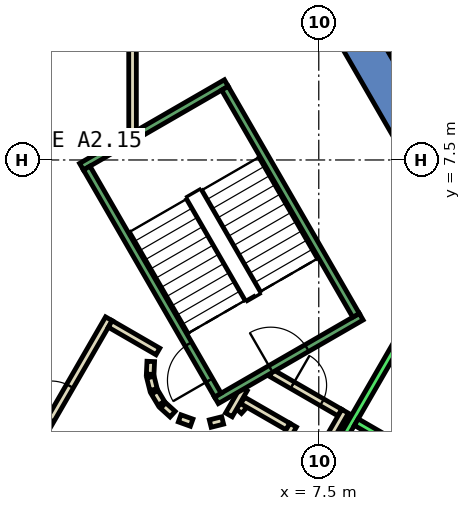
"""IFC4 building model, lengths in metres.
Left out: names, types, materials, properties, quantities, classifications, styles, units other than length and angle.
Written with IfcOpenShell. Run it as: python <this file> out.ifc"""

import sys

from ifc_helpers import new_model, si_unit, direction, frame, frame_2d, origin, place, context, subcontext, project, spatial, polyline, rectangle, outline, extrude, element, fill, save


model = new_model("IFC4")
c1 = context("Model", 3, precision=1e-05, world=origin(), true_north=direction((0.0, 1.0)))
c2 = subcontext(c1, "Body", "Model", "MODEL_VIEW")
j1 = project(units=[si_unit("LENGTHUNIT", "METRE"), si_unit("PLANEANGLEUNIT", "RADIAN")], contexts=[c1])
p1 = place(None, origin())
s1 = spatial("IfcSite", under=j1, at=p1, CompositionType="ELEMENT")
p2 = place(p1, origin())
s2 = spatial("IfcBuilding", under=s1, at=p2, CompositionType="ELEMENT")
p3 = place(p2, frame((0.0, 0.0, 68.6)))
s3 = spatial("IfcBuildingStorey", under=s2, at=p3, CompositionType="ELEMENT", Elevation=68.6)
p4 = place(p3, frame((0.0, 0.0, -0.4)))
e1 = element("IfcWall", 1, at=p4, inside=s3, PredefinedType="SHEAR", context=c2, shape_type="SweptSolid", body=[
    extrude(outline(polyline([(8.517, 11.748), (7.651, 11.248), (12.702, 2.5), (13.856, 2.5), (8.517, 11.748)])), origin(), (0.0, 0.0, 1.0), 4.2),
])
p5 = place(p3, frame((1.88, 7.8, 0.0), z_axis=(0.0, 0.0, 1.0), x_axis=(-1.0, 0.0, 0.0)))
e2 = element("IfcWall", 2, at=p5, inside=s3, PredefinedType="PARTITIONING", context=c2, shape_type="SweptSolid", body=[
    extrude(rectangle(XDim=1.78, YDim=0.2, at=frame_2d((0.89, 0.0))), origin(), (0.0, 0.0, 1.0), 3.8),
])
p6 = place(p3, frame((2.599, 10.7, 0.0), z_axis=(0.0, 0.0, 1.0), x_axis=(0.000393159002, -0.999999922713, 0.0)))
e3 = element("IfcWall", 3, at=p6, inside=s3, PredefinedType="PARTITIONING", context=c2, shape_type="SweptSolid", body=[
    extrude(rectangle(XDim=2.484, YDim=0.2, at=frame_2d((1.242, 0.0))), origin(), (0.0, 0.0, 1.0), 3.8),
])
p7 = place(p3, frame((5.39, 0.898, 0.0), z_axis=(0.0, 0.0, 1.0), x_axis=(0.673828488714, 0.738887791073, 0.0)))
e4 = element("IfcWall", 4, at=p7, inside=s3, PredefinedType="PARTITIONING", context=c2, shape_type="SweptSolid", body=[
    extrude(rectangle(XDim=0.263, YDim=0.2, at=frame_2d((0.131, 0.0))), origin(), (0.0, 0.0, 1.0), 3.8),
])
p8 = place(p3, frame((5.499, 1.172, 0.0), z_axis=(0.0, 0.0, 1.0), x_axis=(0.866333505267, -0.499465972466, 0.0)))
e5 = element("IfcWall", 5, at=p8, inside=s3, PredefinedType="PARTITIONING", context=c2, shape_type="SweptSolid", body=[
    extrude(rectangle(XDim=1.374, YDim=0.2, at=frame_2d((0.687, 0.0))), origin(), (0.0, 0.0, 1.0), 3.8),
])
p9 = place(p3, frame((6.826, 0.522, 0.0), z_axis=(0.0, 0.0, 1.0), x_axis=(-0.500016722714, -0.866015748706, 0.0)))
e6 = element("IfcWall", 6, at=p9, inside=s3, PredefinedType="PARTITIONING", context=c2, shape_type="SweptSolid", body=[
    extrude(rectangle(XDim=1.7, YDim=0.2, at=frame_2d((0.85, 0.0))), origin(), (0.0, 0.0, 1.0), 3.8),
])
p10 = place(p3, frame((6.25, 1.894, 0.0), z_axis=(0.0, 0.0, 1.0), x_axis=(0.866043184279, -0.499969202016, 0.0)))
e7 = element("IfcWall", 7, at=p10, inside=s3, PredefinedType="PARTITIONING", context=c2, shape_type="SweptSolid", body=[
    extrude(rectangle(XDim=2.084, YDim=0.2, at=frame_2d((1.042, 0.0))), origin(), (0.0, 0.0, 1.0), 3.8),
])
p11 = place(p10, frame((0.642, 0.0, 0.0)))
e8 = element("IfcOpeningElement", 8, at=p11, cuts=e7, PredefinedType="OPENING", context=c2, shape_type="SweptSolid", body=[
    extrude(rectangle(XDim=0.9, YDim=2.1, at=frame_2d((0.45, 1.05))), frame((0.0, 0.11, 0.0), z_axis=(0.0, -1.0, 0.0), x_axis=(1.0, 0.0, 0.0)), (0.0, 0.0, 1.0), 0.22),
])
p12 = place(p3, frame((8.192, 0.888, 0.0), z_axis=(0.0, 0.0, 1.0), x_axis=(-0.499940625693, -0.866059680843, 0.0)))
e9 = element("IfcWall", 9, at=p12, inside=s3, PredefinedType="PARTITIONING", context=c2, shape_type="SweptSolid", body=[
    extrude(rectangle(XDim=2.68, YDim=0.2, at=frame_2d((1.34, 0.0))), origin(), (0.0, 0.0, 1.0), 3.8),
])
p13 = place(p3, frame((5.135, 0.793, 0.0), z_axis=(0.0, 0.0, 1.0), x_axis=(0.499526442893, 0.866298639529, 0.0)))
e10 = element("IfcWall", 10, at=p13, inside=s3, PredefinedType="PARTITIONING", context=c2, shape_type="SweptSolid", body=[
    extrude(rectangle(XDim=0.791, YDim=0.2, at=frame_2d((0.396, 0.0))), origin(), (0.0, 0.0, 1.0), 3.8),
])
p14 = place(p3, frame((-0.52, -1.0, 0.0), z_axis=(0.0, 0.0, 1.0), x_axis=(0.50011622646, 0.865958290007, 0.0)))
e11 = element("IfcWall", 11, at=p14, inside=s3, PredefinedType="PARTITIONING", context=c2, shape_type="SweptSolid", body=[
    extrude(rectangle(XDim=4.991, YDim=0.2, at=frame_2d((2.496, 0.0))), origin(), (0.0, 0.0, 1.0), 3.8),
])
p15 = place(p14, frame((1.945, 0.0, 0.0)))
e12 = element("IfcOpeningElement", 12, at=p15, cuts=e11, PredefinedType="OPENING", context=c2, shape_type="SweptSolid", body=[
    extrude(rectangle(XDim=1.0, YDim=2.1, at=frame_2d((0.5, 1.05))), frame((0.0, 0.11, 0.0), z_axis=(0.0, -1.0, 0.0), x_axis=(1.0, 0.0, 0.0)), (0.0, 0.0, 1.0), 0.22),
])
p16 = place(p3, frame((2.012, 3.186, 0.0), z_axis=(0.0, 0.0, 1.0), x_axis=(0.865891012941, -0.500232699559, 0.0)))
e13 = element("IfcWall", 13, at=p16, inside=s3, PredefinedType="PARTITIONING", context=c2, shape_type="SweptSolid", body=[
    extrude(rectangle(XDim=1.449, YDim=0.2, at=frame_2d((0.725, 0.0))), origin(), (0.0, 0.0, 1.0), 3.8),
])
p17 = place(p3, frame((3.079, 2.199, 0.0), z_axis=(0.0, 0.0, 1.0), x_axis=(-0.047771483479, -0.998858290933, 0.0)))
e14 = element("IfcWall", 14, at=p17, inside=s3, PredefinedType="PARTITIONING", context=c2, shape_type="SweptSolid", body=[
    extrude(rectangle(XDim=0.337, YDim=0.2, at=frame_2d((0.169, 0.0))), origin(), (0.0, 0.0, 1.0), 3.8),
])
p18 = place(p3, frame((3.07, 1.786, 0.0), z_axis=(0.0, 0.0, 1.0), x_axis=(0.242705583207, -0.970099994784, 0.0)))
e15 = element("IfcWall", 15, at=p18, inside=s3, PredefinedType="PARTITIONING", context=c2, shape_type="SweptSolid", body=[
    extrude(rectangle(XDim=0.338, YDim=0.2, at=frame_2d((0.169, 0.0))), origin(), (0.0, 0.0, 1.0), 3.8),
])
for number, where, z_axis, x_axis in (
    (16, (3.182, 1.388, 0.0), (0.0, 0.0, 1.0), (0.512, -0.859, 0.0)),
    (17, (3.404, 1.039, 0.0), (0.0, 0.0, 1.0), (0.74, -0.672, 0.0)),
):
    element("IfcWall", number, at=place(p3, frame(where, z_axis=z_axis, x_axis=x_axis)), inside=s3, PredefinedType="PARTITIONING", context=c2, shape_type="SweptSolid", body=[
        extrude(rectangle(XDim=0.338, YDim=0.2, at=frame_2d((0.169, 0.0))), origin(), (0.0, 0.0, 1.0), 3.8),
    ])
p19 = place(p3, frame((3.838, 0.702, 0.0), z_axis=(0.0, 0.0, 1.0), x_axis=(0.941035081519, -0.338308993895, 0.0)))
e18 = element("IfcWall", 18, at=p19, inside=s3, PredefinedType="PARTITIONING", context=c2, shape_type="SweptSolid", body=[
    extrude(rectangle(XDim=0.337, YDim=0.2, at=frame_2d((0.168, 0.0))), origin(), (0.0, 0.0, 1.0), 3.8),
])
p20 = place(p3, frame((4.644, 0.564, 0.0), z_axis=(0.0, 0.0, 1.0), x_axis=(0.969929076366, 0.243387729394, 0.0)))
e19 = element("IfcWall", 19, at=p20, inside=s3, PredefinedType="PARTITIONING", context=c2, shape_type="SweptSolid", body=[
    extrude(rectangle(XDim=0.337, YDim=0.2, at=frame_2d((0.168, 0.0))), origin(), (0.0, 0.0, 1.0), 3.8),
])
p21 = place(p3, frame((4.451, -6.19, 0.0), z_axis=(0.0, 0.0, 1.0), x_axis=(0.50000090737, 0.866024879913, 0.0)))
e20 = element("IfcWall", 20, at=p21, inside=s3, PredefinedType="STANDARD", context=c2, shape_type="SweptSolid", body=[
    extrude(rectangle(XDim=10.6, YDim=0.2, at=frame_2d((5.3, 0.0))), origin(), (0.0, 0.0, 1.0), 3.8),
])
p22 = place(p3, frame((8.488, 0.602, 0.0), z_axis=(0.0, 0.0, 1.0), x_axis=(0.866022959057, -0.500004234368, 0.0)))
e21 = element("IfcWall", 21, at=p22, inside=s3, PredefinedType="STANDARD", context=c2, shape_type="SweptSolid", body=[
    extrude(rectangle(XDim=2.5, YDim=0.2, at=frame_2d((1.25, 0.0))), origin(), (0.0, 0.0, 1.0), 3.8),
])
p23 = place(p3, frame((4.806, 1.176, 0.0), z_axis=(0.0, 0.0, 1.0), x_axis=(0.866059941101, 0.499940174841, 0.0)))
e22 = element("IfcWall", 22, at=p23, inside=s3, PredefinedType="STANDARD", context=c2, shape_type="SweptSolid", body=[
    extrude(rectangle(XDim=4.4, YDim=0.2, at=frame_2d((2.2, 0.0))), origin(), (0.0, 0.0, 1.0), 3.8),
])
p24 = place(p23, frame((1.65, 0.0, 0.0)))
e23 = element("IfcOpeningElement", 23, at=p24, cuts=e22, PredefinedType="OPENING", context=c2, shape_type="SweptSolid", body=[
    extrude(rectangle(XDim=1.1, YDim=2.2, at=frame_2d((0.55, 1.1))), frame((0.0, 0.11, 0.0), z_axis=(0.0, -1.0, 0.0), x_axis=(1.0, 0.0, 0.0)), (0.0, 0.0, 1.0), 0.22),
])
p25 = place(p3, frame((1.256, 7.324, 0.0), z_axis=(0.0, 0.0, 1.0), x_axis=(0.866046073146, 0.499964197906, 0.0)))
e24 = element("IfcWall", 24, at=p25, inside=s3, PredefinedType="STANDARD", context=c2, shape_type="SweptSolid", body=[
    extrude(rectangle(XDim=4.4, YDim=0.2, at=frame_2d((2.2, 0.0))), origin(), (0.0, 0.0, 1.0), 3.8),
])
p26 = place(p3, frame((4.843, 1.312, 0.0), z_axis=(0.0, 0.0, 1.0), x_axis=(-0.499963383562, 0.866046543262, 0.0)))
e25 = element("IfcWall", 25, at=p26, inside=s3, PredefinedType="STANDARD", context=c2, shape_type="SweptSolid", body=[
    extrude(rectangle(XDim=6.9, YDim=0.2, at=frame_2d((3.45, 0.0))), origin(), (0.0, 0.0, 1.0), 3.8),
])
p27 = place(p26, frame((0.45, 0.0, 0.0)))
e26 = element("IfcOpeningElement", 26, at=p27, cuts=e25, PredefinedType="OPENING", context=c2, shape_type="SweptSolid", body=[
    extrude(rectangle(XDim=1.1, YDim=2.2, at=frame_2d((0.55, 1.1))), frame((0.0, 0.11, 0.0), z_axis=(0.0, -1.0, 0.0), x_axis=(1.0, 0.0, 0.0)), (0.0, 0.0, 1.0), 0.22),
])
p28 = place(p3, frame((8.48, 3.412, 0.0), z_axis=(0.0, 0.0, 1.0), x_axis=(-0.499978703459, 0.866037698999, 0.0)))
e27 = element("IfcWall", 27, at=p28, inside=s3, PredefinedType="STANDARD", context=c2, shape_type="SweptSolid", body=[
    extrude(rectangle(XDim=6.9, YDim=0.2, at=frame_2d((3.45, 0.0))), origin(), (0.0, 0.0, 1.0), 3.8),
])
p29 = place(p15, origin())
e28 = element("IfcDoor", 28, at=p29, inside=s3, OperationType="SINGLE_SWING_LEFT", PredefinedType="DOOR", context=c2, shape_type="SweptSolid", body=[
    extrude(rectangle(XDim=1.0, YDim=2.1, at=frame_2d((0.5, 1.05))), frame((0.0, 0.025, 0.0), z_axis=(0.0, -1.0, 0.0), x_axis=(1.0, 0.0, 0.0)), (0.0, 0.0, 1.0), 0.05),
])
fill(e12, e28)
p30 = place(p11, origin())
e29 = element("IfcDoor", 29, at=p30, inside=s3, OperationType="SINGLE_SWING_LEFT", PredefinedType="DOOR", context=c2, shape_type="SweptSolid", body=[
    extrude(rectangle(XDim=0.9, YDim=2.1, at=frame_2d((0.45, 1.05))), frame((0.0, 0.025, 0.0), z_axis=(0.0, -1.0, 0.0), x_axis=(1.0, 0.0, 0.0)), (0.0, 0.0, 1.0), 0.05),
])
fill(e8, e29)
p31 = place(p27, origin())
e30 = element("IfcDoor", 30, at=p31, inside=s3, OperationType="SINGLE_SWING_LEFT", PredefinedType="DOOR", context=c2, shape_type="SweptSolid", body=[
    extrude(rectangle(XDim=1.1, YDim=2.2, at=frame_2d((0.55, 1.1))), frame((0.0, 0.025, 0.0), z_axis=(0.0, -1.0, 0.0), x_axis=(1.0, 0.0, 0.0)), (0.0, 0.0, 1.0), 0.05),
])
fill(e26, e30)
p32 = place(p24, origin())
e31 = element("IfcDoor", 31, at=p32, inside=s3, OperationType="SINGLE_SWING_LEFT", PredefinedType="DOOR", context=c2, shape_type="SweptSolid", body=[
    extrude(rectangle(XDim=1.1, YDim=2.2, at=frame_2d((0.55, 1.1))), frame((0.0, 0.025, 0.0), z_axis=(0.0, -1.0, 0.0), x_axis=(1.0, 0.0, 0.0)), (0.0, 0.0, 1.0), 0.05),
])
fill(e23, e31)
save(model, sys.argv[1])
